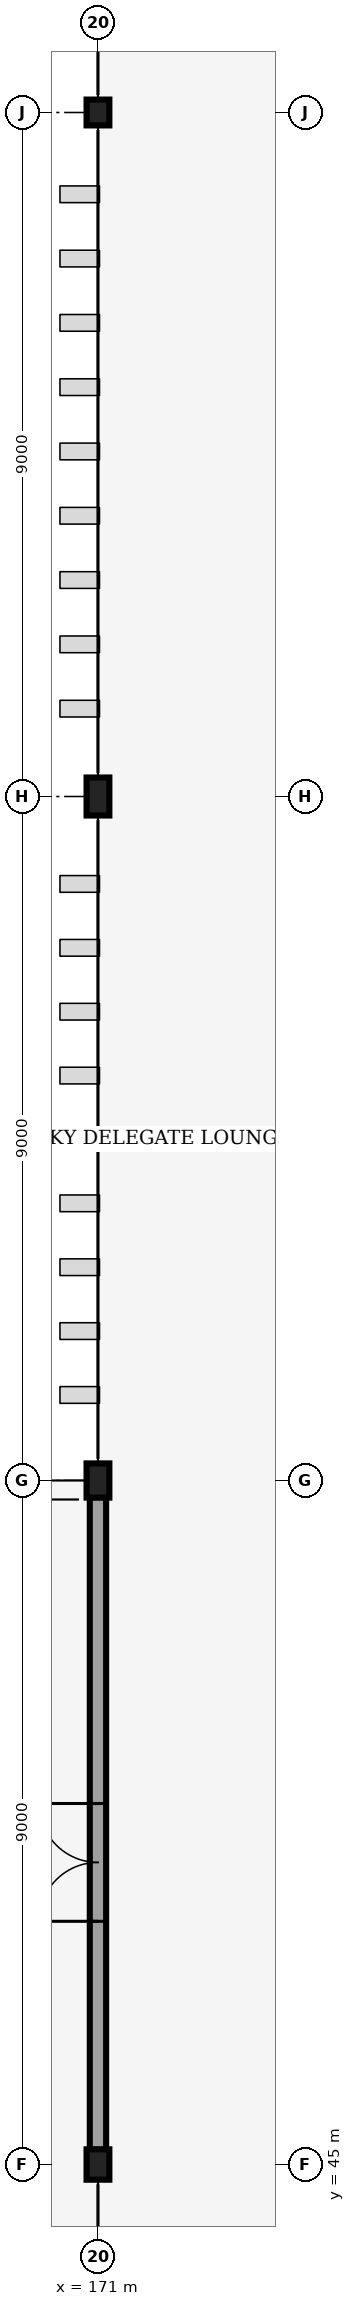
"""IFC4 building model, lengths in metres.
Left out: names, types, materials, properties, quantities, classifications, styles, units other than length and angle.
Written with IfcOpenShell. Run it as: python <this file> out.ifc"""

import sys

from ifc_helpers import new_model, si_unit, direction, frame, frame_2d, origin, origin_2d, place, context, subcontext, project, spatial, rectangle, i_section, extrude, element, fill, save


model = new_model("IFC4")
c1 = context("Model", 3, precision=1e-05, world=origin(), true_north=direction((0.0, 1.0)))
c2 = subcontext(c1, "Body", "Model", "MODEL_VIEW")
j1 = project(units=[si_unit("LENGTHUNIT", "METRE"), si_unit("PLANEANGLEUNIT", "RADIAN")], contexts=[c1])
p1 = place(None, origin())
s1 = spatial("IfcSite", under=j1, at=p1, CompositionType="ELEMENT")
p2 = place(p1, origin())
s2 = spatial("IfcBuilding", under=s1, at=p2, CompositionType="ELEMENT")
p3 = place(p2, frame((0.0, 0.0, 26.8)))
s3 = spatial("IfcBuildingStorey", under=s2, at=p3, CompositionType="ELEMENT", Elevation=26.8)
p4 = place(p3, frame((171.0, 45.0, 0.0), z_axis=(0.0, 0.0, 1.0), x_axis=(1.0, 0.0, 0.0)))
e1 = element("IfcColumn", 1, at=p4, inside=s3, PredefinedType="COLUMN", context=c2, shape_type="SweptSolid", body=[
    extrude(i_section(OverallWidth=0.3, OverallDepth=0.4, WebThickness=0.013, FlangeThickness=0.024, FilletRadius=0.027, at=origin_2d()), origin(), (0.0, 0.0, 1.0), 3.0),
])
p5 = place(p3, frame((171.0, 54.0, 0.0), z_axis=(0.0, 0.0, 1.0), x_axis=(1.0, 0.0, 0.0)))
e2 = element("IfcColumn", 2, at=p5, inside=s3, PredefinedType="COLUMN", context=c2, shape_type="SweptSolid", body=[
    extrude(i_section(OverallWidth=0.3, OverallDepth=0.45, WebThickness=0.014, FlangeThickness=0.026, FilletRadius=0.027, at=origin_2d()), origin(), (0.0, 0.0, 1.0), 3.0),
])
p6 = place(p3, frame((171.0, 63.0, 0.0), z_axis=(0.0, 0.0, 1.0), x_axis=(1.0, 0.0, 0.0)))
e3 = element("IfcColumn", 3, at=p6, inside=s3, PredefinedType="COLUMN", context=c2, shape_type="SweptSolid", body=[
    extrude(i_section(OverallWidth=0.3, OverallDepth=0.5, WebThickness=0.014, FlangeThickness=0.028, FilletRadius=0.027, at=origin_2d()), origin(), (0.0, 0.0, 1.0), 3.0),
])
p7 = place(p3, frame((171.0, 72.0, 0.0), z_axis=(0.0, 0.0, 1.0), x_axis=(1.0, 0.0, 0.0)))
e4 = element("IfcColumn", 4, at=p7, inside=s3, PredefinedType="COLUMN", context=c2, shape_type="SweptSolid", body=[
    extrude(i_section(OverallWidth=0.3, OverallDepth=0.34, WebThickness=0.012, FlangeThickness=0.021, FilletRadius=0.027, at=origin_2d()), origin(), (0.0, 0.0, 1.0), 3.0),
])
p8 = place(p3, frame((171.0, 45.195, 0.0), z_axis=(0.0, 0.0, 1.0), x_axis=(0.0, 1.0, 0.0)))
e5 = element("IfcWall", 5, at=p8, inside=s3, PredefinedType="SOLIDWALL", context=c2, shape_type="SweptSolid", body=[
    extrude(rectangle(XDim=8.585, YDim=0.215, at=frame_2d((4.292, 0.0))), origin(), (0.0, 0.0, 1.0), 2.35),
])
p9 = place(p8, frame((3.005, 0.0, 0.0)))
e6 = element("IfcOpeningElement", 6, at=p9, cuts=e5, PredefinedType="OPENING", context=c2, shape_type="SweptSolid", body=[
    extrude(rectangle(XDim=1.55, YDim=2.15, at=frame_2d((0.775, 1.075))), frame((0.0, 0.117, 0.0), z_axis=(0.0, -1.0, 0.0), x_axis=(1.0, 0.0, 0.0)), (0.0, 0.0, 1.0), 0.235),
])
p10 = place(p9, origin())
e7 = element("IfcDoor", 7, at=p10, inside=s3, OperationType="DOUBLE_DOOR_SINGLE_SWING", PredefinedType="DOOR", context=c2, shape_type="SweptSolid", body=[
    extrude(rectangle(XDim=1.55, YDim=2.15, at=frame_2d((0.775, 1.075))), frame((0.0, 0.025, 0.0), z_axis=(0.0, -1.0, 0.0), x_axis=(1.0, 0.0, 0.0)), (0.0, 0.0, 1.0), 0.05),
])
fill(e6, e7)
save(model, sys.argv[1])
